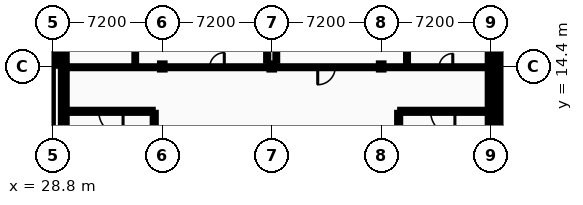
"""IFC4 building model, lengths in metres.
Left out: names, types, materials, properties, quantities, classifications, styles, units other than length and angle.
Written with IfcOpenShell. Run it as: python <this file> out.ifc"""

import sys

from ifc_helpers import new_model, si_unit, direction, frame, frame_2d, origin, origin_2d, place, context, subcontext, project, spatial, rectangle, i_section, extrude, element, fill, save


model = new_model("IFC4")
c1 = context("Model", 3, precision=1e-05, world=origin(), true_north=direction((0.0, 1.0)))
c2 = subcontext(c1, "Body", "Model", "MODEL_VIEW")
j1 = project(units=[si_unit("LENGTHUNIT", "METRE"), si_unit("PLANEANGLEUNIT", "RADIAN")], contexts=[c1])
p1 = place(None, origin())
s1 = spatial("IfcSite", under=j1, at=p1, CompositionType="ELEMENT")
p2 = place(p1, origin())
s2 = spatial("IfcBuilding", under=s1, at=p2, CompositionType="ELEMENT")
p3 = place(p2, frame((0.0, 0.0, 5.2)))
s3 = spatial("IfcBuildingStorey", under=s2, at=p3, CompositionType="ELEMENT", Elevation=5.2)
for number, where, z_axis, x_axis in (
    (1, (29.52, 14.4, 0.0), (0.0, 0.0, 1.0), (1.0, 0.0, 0.0)),
    (2, (36.0, 14.4, 0.0), (0.0, 0.0, 1.0), (1.0, 0.0, 0.0)),
    (3, (43.2, 14.4, 0.0), (0.0, 0.0, 1.0), (1.0, 0.0, 0.0)),
    (4, (50.4, 14.4, 0.0), (0.0, 0.0, 1.0), (1.0, 0.0, 0.0)),
    (5, (57.6, 14.4, 0.0), (0.0, 0.0, 1.0), (1.0, 0.0, 0.0)),
    (6, (58.32, 14.4, 0.0), (0.0, 0.0, 1.0), (1.0, 0.0, 0.0)),
):
    element("IfcColumn", number, at=place(p3, frame(where, z_axis=z_axis, x_axis=x_axis)), inside=s3, PredefinedType="COLUMN", context=c2, shape_type="SweptSolid", body=[
        extrude(i_section(OverallWidth=0.3, OverallDepth=0.4, WebThickness=0.013, FlangeThickness=0.024, FilletRadius=0.027, at=origin_2d()), origin(), (0.0, 0.0, 1.0), 4.4),
    ])
p4 = place(p3, frame((28.8, 14.45, 0.0), z_axis=(0.0, 0.0, 1.0), x_axis=(0.0, 1.0, 0.0)))
e7 = element("IfcWall", 7, at=p4, inside=s3, PredefinedType="STANDARD", context=c2, shape_type="SweptSolid", body=[
    extrude(rectangle(XDim=7.15, YDim=0.38, at=frame_2d((3.575, 0.0))), origin(), (0.0, 0.0, 1.0), 4.185),
])
p5 = place(p4, frame((1.63, 0.0, 0.95)))
e8 = element("IfcOpeningElement", 8, at=p5, cuts=e7, PredefinedType="OPENING", context=c2, shape_type="SweptSolid", body=[
    extrude(rectangle(XDim=1.03, YDim=1.296, at=frame_2d((0.515, 0.648))), frame((0.0, 0.2, 0.0), z_axis=(0.0, -1.0, 0.0), x_axis=(1.0, 0.0, 0.0)), (0.0, 0.0, 1.0), 0.4),
])
p6 = place(p4, frame((4.49, 0.0, 0.95)))
e9 = element("IfcOpeningElement", 9, at=p6, cuts=e7, PredefinedType="OPENING", context=c2, shape_type="SweptSolid", body=[
    extrude(rectangle(XDim=1.03, YDim=1.296, at=frame_2d((0.515, 0.648))), frame((0.0, 0.2, 0.0), z_axis=(0.0, -1.0, 0.0), x_axis=(1.0, 0.0, 0.0)), (0.0, 0.0, 1.0), 0.4),
])
p7 = place(p3, frame((29.52, 14.4, 0.0), z_axis=(0.0, 0.0, 1.0), x_axis=(0.0, -1.0, 0.0)))
e10 = element("IfcWall", 10, at=p7, inside=s3, PredefinedType="STANDARD", context=c2, shape_type="SweptSolid", body=[
    extrude(rectangle(XDim=5.5, YDim=0.38, at=frame_2d((2.75, 0.0))), origin(), (0.0, 0.0, 1.0), 4.185),
])
p8 = place(p3, frame((29.52, 21.6, 0.0), z_axis=(0.0, 0.0, 1.0), x_axis=(0.0, -1.0, 0.0)))
e11 = element("IfcWall", 11, at=p8, inside=s3, PredefinedType="STANDARD", context=c2, shape_type="SweptSolid", body=[
    extrude(rectangle(XDim=7.2, YDim=0.38, at=frame_2d((3.6, 0.0))), origin(), (0.0, 0.0, 1.0), 3.88),
])
p9 = place(p8, frame((1.645, 0.0, 0.95)))
e12 = element("IfcOpeningElement", 12, at=p9, cuts=e11, PredefinedType="OPENING", context=c2, shape_type="SweptSolid", body=[
    extrude(rectangle(XDim=1.03, YDim=1.332, at=frame_2d((0.515, 0.666))), frame((0.0, 0.2, 0.0), z_axis=(0.0, -1.0, 0.0), x_axis=(1.0, 0.0, 0.0)), (0.0, 0.0, 1.0), 0.4),
])
p10 = place(p8, frame((4.525, 0.0, 0.95)))
e13 = element("IfcOpeningElement", 13, at=p10, cuts=e11, PredefinedType="OPENING", context=c2, shape_type="SweptSolid", body=[
    extrude(rectangle(XDim=1.03, YDim=1.332, at=frame_2d((0.515, 0.666))), frame((0.0, 0.2, 0.0), z_axis=(0.0, -1.0, 0.0), x_axis=(1.0, 0.0, 0.0)), (0.0, 0.0, 1.0), 0.4),
])
p11 = place(p3, frame((57.6, 8.9, 0.0), z_axis=(0.0, 0.0, 1.0), x_axis=(0.0, 1.0, 0.0)))
e14 = element("IfcWall", 14, at=p11, inside=s3, PredefinedType="STANDARD", context=c2, shape_type="SweptSolid", body=[
    extrude(rectangle(XDim=5.5, YDim=0.38, at=frame_2d((2.75, 0.0))), origin(), (0.0, 0.0, 1.0), 4.185),
])
p12 = place(p3, frame((57.6, 14.4, 0.0), z_axis=(0.0, 0.0, 1.0), x_axis=(0.0, 1.0, 0.0)))
e15 = element("IfcWall", 15, at=p12, inside=s3, PredefinedType="STANDARD", context=c2, shape_type="SweptSolid", body=[
    extrude(rectangle(XDim=7.2, YDim=0.38, at=frame_2d((3.6, 0.0))), origin(), (0.0, 0.0, 1.0), 3.88),
])
p13 = place(p12, frame((1.577, 0.0, 0.95)))
e16 = element("IfcOpeningElement", 16, at=p13, cuts=e15, PredefinedType="OPENING", context=c2, shape_type="SweptSolid", body=[
    extrude(rectangle(XDim=1.166, YDim=1.332, at=frame_2d((0.583, 0.666))), frame((0.0, 0.2, 0.0), z_axis=(0.0, -1.0, 0.0), x_axis=(1.0, 0.0, 0.0)), (0.0, 0.0, 1.0), 0.4),
])
p14 = place(p12, frame((4.457, 0.0, 0.95)))
e17 = element("IfcOpeningElement", 17, at=p14, cuts=e15, PredefinedType="OPENING", context=c2, shape_type="SweptSolid", body=[
    extrude(rectangle(XDim=1.166, YDim=1.332, at=frame_2d((0.583, 0.666))), frame((0.0, 0.2, 0.0), z_axis=(0.0, -1.0, 0.0), x_axis=(1.0, 0.0, 0.0)), (0.0, 0.0, 1.0), 0.4),
])
p15 = place(p3, frame((58.32, 14.4, 0.0), z_axis=(0.0, 0.0, 1.0), x_axis=(0.0, -1.0, 0.0)))
e18 = element("IfcWall", 18, at=p15, inside=s3, PredefinedType="STANDARD", context=c2, shape_type="SweptSolid", body=[
    extrude(rectangle(XDim=5.5, YDim=0.38, at=frame_2d((2.75, 0.0))), origin(), (0.0, 0.0, 1.0), 4.185),
])
p16 = place(p3, frame((58.32, 21.6, 0.0), z_axis=(0.0, 0.0, 1.0), x_axis=(0.0, -1.0, 0.0)))
e19 = element("IfcWall", 19, at=p16, inside=s3, PredefinedType="STANDARD", context=c2, shape_type="SweptSolid", body=[
    extrude(rectangle(XDim=7.2, YDim=0.38, at=frame_2d((3.6, 0.0))), origin(), (0.0, 0.0, 1.0), 3.88),
])
p17 = place(p16, frame((1.713, 0.0, 0.95)))
e20 = element("IfcOpeningElement", 20, at=p17, cuts=e19, PredefinedType="OPENING", context=c2, shape_type="SweptSolid", body=[
    extrude(rectangle(XDim=0.894, YDim=1.296, at=frame_2d((0.447, 0.648))), frame((0.0, 0.2, 0.0), z_axis=(0.0, -1.0, 0.0), x_axis=(1.0, 0.0, 0.0)), (0.0, 0.0, 1.0), 0.4),
])
p18 = place(p16, frame((4.593, 0.0, 0.95)))
e21 = element("IfcOpeningElement", 21, at=p18, cuts=e19, PredefinedType="OPENING", context=c2, shape_type="SweptSolid", body=[
    extrude(rectangle(XDim=0.894, YDim=1.296, at=frame_2d((0.447, 0.648))), frame((0.0, 0.2, 0.0), z_axis=(0.0, -1.0, 0.0), x_axis=(1.0, 0.0, 0.0)), (0.0, 0.0, 1.0), 0.4),
])
p19 = place(p3, frame((28.6, 5.85, 0.0), z_axis=(0.0, 0.0, 1.0), x_axis=(0.0, 1.0, 0.0)))
e22 = element("IfcWall", 22, at=p19, inside=s3, PredefinedType="SHEAR", context=c2, shape_type="SweptSolid", body=[
    extrude(rectangle(XDim=8.6, YDim=0.4, at=frame_2d((4.3, 0.0))), origin(), (0.0, 0.0, 1.0), 4.185),
])
p20 = place(p3, frame((29.87, 11.45, 0.0), z_axis=(0.0, 0.0, 1.0), x_axis=(1.0, 0.0, 0.0)))
e23 = element("IfcWall", 23, at=p20, inside=s3, PredefinedType="PARTITIONING", context=c2, shape_type="SweptSolid", body=[
    extrude(rectangle(XDim=5.5, YDim=0.2, at=frame_2d((2.75, 0.0))), origin(), (0.0, 0.0, 1.0), 4.185),
])
p21 = place(p20, frame((1.95, 0.0, 0.0)))
e24 = element("IfcOpeningElement", 24, at=p21, cuts=e23, PredefinedType="OPENING", context=c2, shape_type="SweptSolid", body=[
    extrude(rectangle(XDim=1.6, YDim=2.2, at=frame_2d((0.8, 1.1))), frame((0.0, 0.11, 0.0), z_axis=(0.0, -1.0, 0.0), x_axis=(1.0, 0.0, 0.0)), (0.0, 0.0, 1.0), 0.22),
])
p22 = place(p3, frame((35.47, 8.9, 0.0), z_axis=(0.0, 0.0, 1.0), x_axis=(0.0, 1.0, 0.0)))
e25 = element("IfcWall", 25, at=p22, inside=s3, PredefinedType="PARTITIONING", context=c2, shape_type="SweptSolid", body=[
    extrude(rectangle(XDim=2.45, YDim=0.2, at=frame_2d((1.225, 0.0))), origin(), (0.0, 0.0, 1.0), 4.185),
])
p23 = place(p3, frame((51.65, 11.45, 0.0), z_axis=(0.0, 0.0, 1.0), x_axis=(1.0, 0.0, 0.0)))
e26 = element("IfcWall", 26, at=p23, inside=s3, PredefinedType="PARTITIONING", context=c2, shape_type="SweptSolid", body=[
    extrude(rectangle(XDim=5.6, YDim=0.2, at=frame_2d((2.8, 0.0))), origin(), (0.0, 0.0, 1.0), 4.185),
])
p24 = place(p23, frame((2.0, 0.0, 0.0)))
e27 = element("IfcOpeningElement", 27, at=p24, cuts=e26, PredefinedType="OPENING", context=c2, shape_type="SweptSolid", body=[
    extrude(rectangle(XDim=1.6, YDim=2.2, at=frame_2d((0.8, 1.1))), frame((0.0, 0.11, 0.0), z_axis=(0.0, -1.0, 0.0), x_axis=(1.0, 0.0, 0.0)), (0.0, 0.0, 1.0), 0.22),
])
p25 = place(p3, frame((51.55, 8.9, 0.0), z_axis=(0.0, 0.0, 1.0), x_axis=(0.0, 1.0, 0.0)))
e28 = element("IfcWall", 28, at=p25, inside=s3, PredefinedType="PARTITIONING", context=c2, shape_type="SweptSolid", body=[
    extrude(rectangle(XDim=2.45, YDim=0.2, at=frame_2d((1.225, 0.0))), origin(), (0.0, 0.0, 1.0), 4.185),
])
p26 = place(p3, frame((29.9, 14.35, 0.0), z_axis=(0.0, 0.0, 1.0), x_axis=(1.0, 0.0, 0.0)))
e29 = element("IfcWall", 29, at=p26, inside=s3, PredefinedType="PARTITIONING", context=c2, shape_type="SweptSolid", body=[
    extrude(rectangle(XDim=5.72, YDim=0.125, at=frame_2d((2.86, 0.0))), origin(), (0.0, 0.0, 1.0), 3.88),
])
p27 = place(p26, frame((2.87, 0.0, 0.0)))
e30 = element("IfcOpeningElement", 30, at=p27, cuts=e29, PredefinedType="OPENING", context=c2, shape_type="SweptSolid", body=[
    extrude(rectangle(XDim=1.0, YDim=2.1, at=frame_2d((0.5, 1.05))), frame((0.0, 0.073, 0.0), z_axis=(0.0, -1.0, 0.0), x_axis=(1.0, 0.0, 0.0)), (0.0, 0.0, 1.0), 0.145),
])
p28 = place(p3, frame((36.38, 14.35, 0.0), z_axis=(0.0, 0.0, 1.0), x_axis=(1.0, 0.0, 0.0)))
e31 = element("IfcWall", 31, at=p28, inside=s3, PredefinedType="PARTITIONING", context=c2, shape_type="SweptSolid", body=[
    extrude(rectangle(XDim=6.44, YDim=0.125, at=frame_2d((3.22, 0.0))), origin(), (0.0, 0.0, 1.0), 3.88),
])
p29 = place(p28, frame((2.741, 0.0, 0.0)))
e32 = element("IfcOpeningElement", 32, at=p29, cuts=e31, PredefinedType="OPENING", context=c2, shape_type="SweptSolid", body=[
    extrude(rectangle(XDim=0.958, YDim=2.124, at=frame_2d((0.479, 1.062))), frame((0.0, 0.073, 0.0), z_axis=(0.0, -1.0, 0.0), x_axis=(1.0, 0.0, 0.0)), (0.0, 0.0, 1.0), 0.145),
])
p30 = place(p3, frame((43.58, 14.35, 0.0), z_axis=(0.0, 0.0, 1.0), x_axis=(1.0, 0.0, 0.0)))
e33 = element("IfcWall", 33, at=p30, inside=s3, PredefinedType="PARTITIONING", context=c2, shape_type="SweptSolid", body=[
    extrude(rectangle(XDim=6.44, YDim=0.125, at=frame_2d((3.22, 0.0))), origin(), (0.0, 0.0, 1.0), 3.88),
])
p31 = place(p30, frame((2.645, 0.0, 0.0)))
e34 = element("IfcOpeningElement", 34, at=p31, cuts=e33, PredefinedType="OPENING", context=c2, shape_type="SweptSolid", body=[
    extrude(rectangle(XDim=1.15, YDim=2.15, at=frame_2d((0.575, 1.075))), frame((0.0, 0.073, 0.0), z_axis=(0.0, -1.0, 0.0), x_axis=(1.0, 0.0, 0.0)), (0.0, 0.0, 1.0), 0.145),
])
p32 = place(p3, frame((50.78, 14.35, 0.0), z_axis=(0.0, 0.0, 1.0), x_axis=(1.0, 0.0, 0.0)))
e35 = element("IfcWall", 35, at=p32, inside=s3, PredefinedType="PARTITIONING", context=c2, shape_type="SweptSolid", body=[
    extrude(rectangle(XDim=6.44, YDim=0.125, at=frame_2d((3.22, 0.0))), origin(), (0.0, 0.0, 1.0), 3.88),
])
p33 = place(p32, frame((3.43, 0.0, 0.0)))
e36 = element("IfcOpeningElement", 36, at=p33, cuts=e35, PredefinedType="OPENING", context=c2, shape_type="SweptSolid", body=[
    extrude(rectangle(XDim=0.9, YDim=2.1, at=frame_2d((0.45, 1.05))), frame((0.0, 0.073, 0.0), z_axis=(0.0, -1.0, 0.0), x_axis=(1.0, 0.0, 0.0)), (0.0, 0.0, 1.0), 0.145),
])
p34 = place(p3, frame((34.22, 14.413, 0.0), z_axis=(0.0, 0.0, 1.0), x_axis=(0.0, 1.0, 0.0)))
e37 = element("IfcWall", 37, at=p34, inside=s3, PredefinedType="PARTITIONING", context=c2, shape_type="SweptSolid", body=[
    extrude(rectangle(XDim=14.188, YDim=0.11, at=frame_2d((7.094, 0.0))), origin(), (0.0, 0.0, 1.0), 4.185),
])
p35 = place(p3, frame((42.9, 14.78, 0.0), z_axis=(0.0, 0.0, 1.0), x_axis=(0.0, 1.0, 0.0)))
e38 = element("IfcWall", 38, at=p35, inside=s3, PredefinedType="PARTITIONING", context=c2, shape_type="SweptSolid", body=[
    extrude(rectangle(XDim=6.44, YDim=0.135, at=frame_2d((3.22, 0.0))), origin(), (0.0, 0.0, 1.0), 4.185),
])
p36 = place(p3, frame((43.5, 14.78, 0.0), z_axis=(0.0, 0.0, 1.0), x_axis=(0.0, 1.0, 0.0)))
e39 = element("IfcWall", 39, at=p36, inside=s3, PredefinedType="PARTITIONING", context=c2, shape_type="SweptSolid", body=[
    extrude(rectangle(XDim=6.44, YDim=0.118, at=frame_2d((3.22, 0.0))), origin(), (0.0, 0.0, 1.0), 4.185),
])
p37 = place(p3, frame((52.1, 14.413, 0.0), z_axis=(0.0, 0.0, 1.0), x_axis=(0.0, 1.0, 0.0)))
e40 = element("IfcWall", 40, at=p37, inside=s3, PredefinedType="PARTITIONING", context=c2, shape_type="SweptSolid", body=[
    extrude(rectangle(XDim=14.188, YDim=0.125, at=frame_2d((7.094, 0.0))), origin(), (0.0, 0.0, 1.0), 4.185),
])
p38 = place(p21, origin())
e41 = element("IfcDoor", 41, at=p38, inside=s3, OperationType="DOUBLE_DOOR_SINGLE_SWING", PredefinedType="DOOR", context=c2, shape_type="SweptSolid", body=[
    extrude(rectangle(XDim=1.6, YDim=2.2, at=frame_2d((0.8, 1.1))), frame((0.0, 0.025, 0.0), z_axis=(0.0, -1.0, 0.0), x_axis=(1.0, 0.0, 0.0)), (0.0, 0.0, 1.0), 0.05),
])
fill(e24, e41)
p39 = place(p24, origin())
e42 = element("IfcDoor", 42, at=p39, inside=s3, OperationType="DOUBLE_DOOR_SINGLE_SWING", PredefinedType="DOOR", context=c2, shape_type="SweptSolid", body=[
    extrude(rectangle(XDim=1.6, YDim=2.2, at=frame_2d((0.8, 1.1))), frame((0.0, 0.025, 0.0), z_axis=(0.0, -1.0, 0.0), x_axis=(1.0, 0.0, 0.0)), (0.0, 0.0, 1.0), 0.05),
])
fill(e27, e42)
p40 = place(p27, frame((1.0, 0.0, 0.0), z_axis=(0.0, 0.0, 1.0), x_axis=(-1.0, 0.0, 0.0)))
e43 = element("IfcDoor", 43, at=p40, inside=s3, OperationType="SLIDING_TO_LEFT", PredefinedType="DOOR", context=c2, shape_type="SweptSolid", body=[
    extrude(rectangle(XDim=1.0, YDim=2.1, at=frame_2d((0.5, 1.05))), frame((0.0, 0.025, 0.0), z_axis=(0.0, -1.0, 0.0), x_axis=(1.0, 0.0, 0.0)), (0.0, 0.0, 1.0), 0.05),
])
fill(e30, e43)
p41 = place(p33, frame((0.9, 0.0, 0.0), z_axis=(0.0, 0.0, 1.0), x_axis=(-1.0, 0.0, 0.0)))
e44 = element("IfcDoor", 44, at=p41, inside=s3, OperationType="SINGLE_SWING_RIGHT", PredefinedType="DOOR", context=c2, shape_type="SweptSolid", body=[
    extrude(rectangle(XDim=0.9, YDim=2.1, at=frame_2d((0.45, 1.05))), frame((0.0, 0.025, 0.0), z_axis=(0.0, -1.0, 0.0), x_axis=(1.0, 0.0, 0.0)), (0.0, 0.0, 1.0), 0.05),
])
fill(e36, e44)
p42 = place(p31, frame((1.15, 0.0, 0.0), z_axis=(0.0, 0.0, 1.0), x_axis=(-1.0, 0.0, 0.0)))
e45 = element("IfcDoor", 45, at=p42, inside=s3, OperationType="SINGLE_SWING_LEFT", PredefinedType="DOOR", context=c2, shape_type="SweptSolid", body=[
    extrude(rectangle(XDim=1.15, YDim=2.15, at=frame_2d((0.575, 1.075))), frame((0.0, 0.025, 0.0), z_axis=(0.0, -1.0, 0.0), x_axis=(1.0, 0.0, 0.0)), (0.0, 0.0, 1.0), 0.05),
])
fill(e34, e45)
p43 = place(p29, frame((0.958, 0.0, 0.0), z_axis=(0.0, 0.0, 1.0), x_axis=(-1.0, 0.0, 0.0)))
e46 = element("IfcDoor", 46, at=p43, inside=s3, OperationType="SINGLE_SWING_RIGHT", PredefinedType="DOOR", context=c2, shape_type="SweptSolid", body=[
    extrude(rectangle(XDim=0.958, YDim=2.124, at=frame_2d((0.479, 1.062))), frame((0.0, 0.025, 0.0), z_axis=(0.0, -1.0, 0.0), x_axis=(1.0, 0.0, 0.0)), (0.0, 0.0, 1.0), 0.05),
])
fill(e32, e46)
save(model, sys.argv[1])
